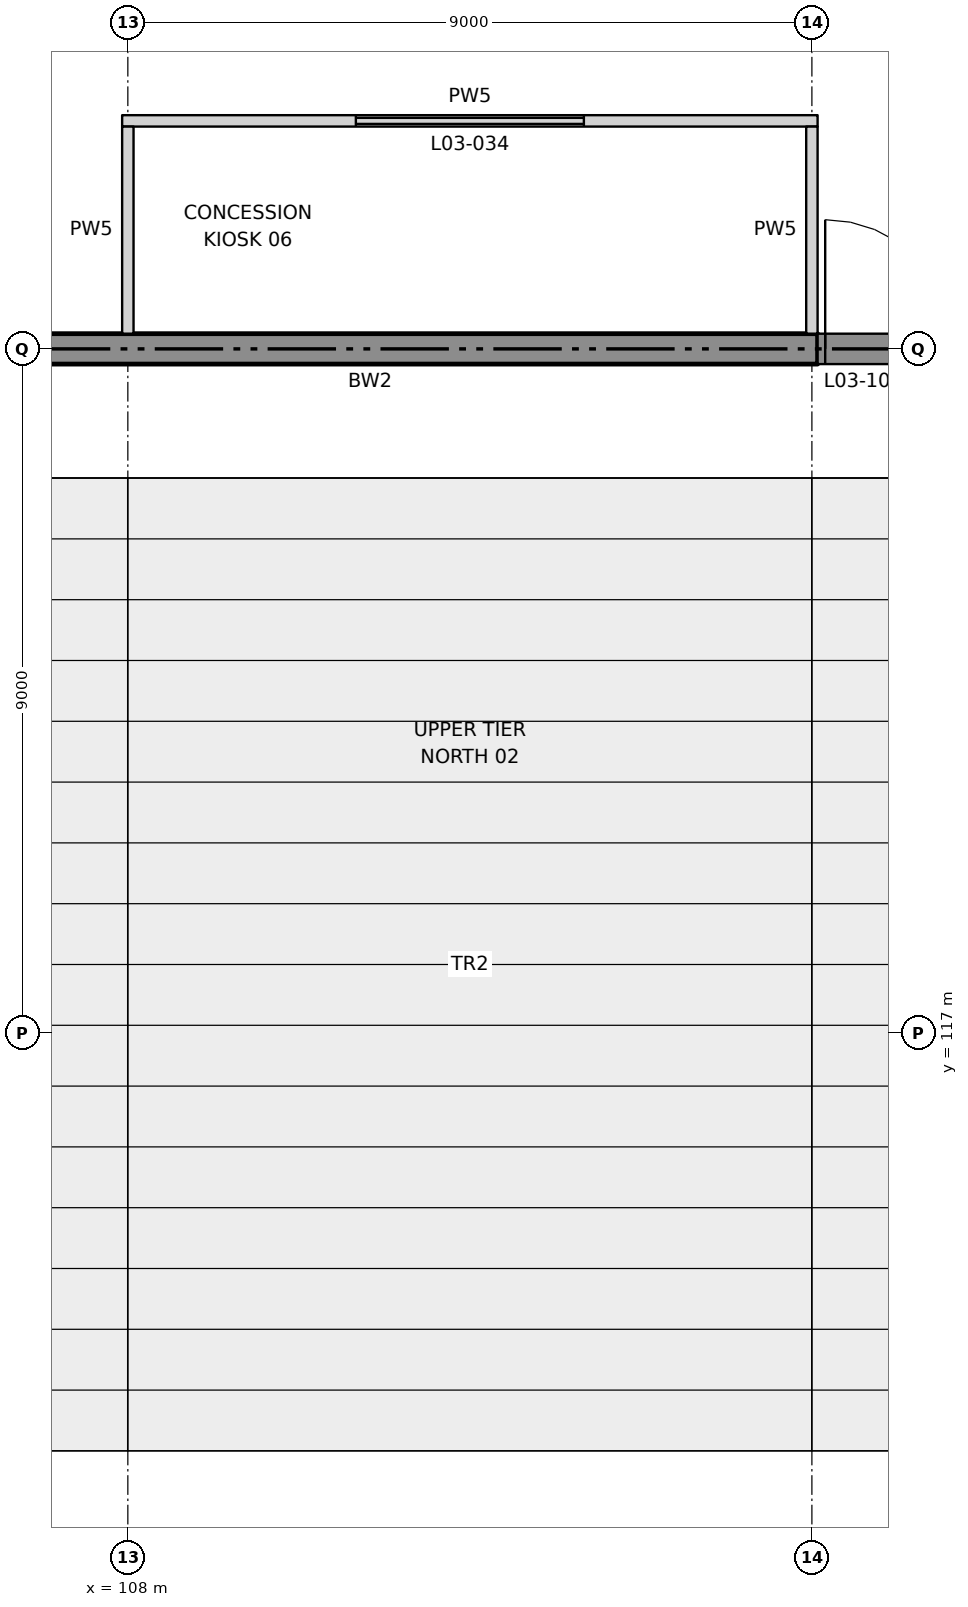
"""IFC4 building model, lengths in metres.
Left out: names, types, materials, properties, quantities, classifications, styles, units other than length and angle.
Written with IfcOpenShell. Run it as: python <this file> out.ifc"""

import sys

from ifc_helpers import new_model, si_unit, direction, frame, frame_2d, origin, place, context, subcontext, project, spatial, rectangle, extrude, element, fill, save


model = new_model("IFC4")
c1 = context("Model", 3, precision=1e-05, world=origin(), true_north=direction((0.0, 1.0)))
c2 = subcontext(c1, "Body", "Model", "MODEL_VIEW")
j1 = project(units=[si_unit("LENGTHUNIT", "METRE"), si_unit("PLANEANGLEUNIT", "RADIAN")], contexts=[c1])
p1 = place(None, origin())
s1 = spatial("IfcSite", under=j1, at=p1, CompositionType="ELEMENT")
p2 = place(p1, origin())
s2 = spatial("IfcBuilding", under=s1, at=p2, CompositionType="ELEMENT")
p3 = place(p2, frame((0.0, 0.0, 22.0)))
s3 = spatial("IfcBuildingStorey", under=s2, at=p3, CompositionType="ELEMENT", Elevation=22.0)
p4 = place(p3, frame((117.075, 126.0, 0.0), z_axis=(0.0, 0.0, 1.0), x_axis=(-1.0, 0.0, 0.0)))
e1 = element("IfcWall", 1, at=p4, inside=s3, PredefinedType="SOLIDWALL", context=c2, shape_type="SweptSolid", body=[
    extrude(rectangle(XDim=11.775, YDim=0.4, at=frame_2d((5.887, 0.0))), origin(), (0.0, 0.0, 1.0), 6.0),
])
p5 = place(p3, frame((107.925, 129.0, 0.0), z_axis=(0.0, 0.0, 1.0), x_axis=(1.0, 0.0, 0.0)))
e2 = element("IfcWall", 2, at=p5, inside=s3, PredefinedType="PARTITIONING", context=c2, shape_type="SweptSolid", body=[
    extrude(rectangle(XDim=9.15, YDim=0.15, at=frame_2d((4.575, 0.0))), origin(), (0.0, 0.0, 1.0), 6.0),
])
p6 = place(p5, frame((3.075, 0.0, 0.0)))
e3 = element("IfcOpeningElement", 3, at=p6, cuts=e2, PredefinedType="OPENING", context=c2, shape_type="SweptSolid", body=[
    extrude(rectangle(XDim=3.0, YDim=2.4, at=frame_2d((1.5, 1.2))), frame((0.0, 0.085, 0.0), z_axis=(0.0, -1.0, 0.0), x_axis=(1.0, 0.0, 0.0)), (0.0, 0.0, 1.0), 0.17),
])
for number, where, z_axis, x_axis in (
    (4, (108.0, 126.2, 0.0), (0.0, 0.0, 1.0), (0.0, 1.0, 0.0)),
    (5, (117.0, 126.2, 0.0), (0.0, 0.0, 1.0), (0.0, 1.0, 0.0)),
):
    element("IfcWall", number, at=place(p3, frame(where, z_axis=z_axis, x_axis=x_axis)), inside=s3, PredefinedType="PARTITIONING", context=c2, shape_type="SweptSolid", body=[
        extrude(rectangle(XDim=2.725, YDim=0.15, at=frame_2d((1.363, 0.0))), origin(), (0.0, 0.0, 1.0), 4.7),
    ])
p7 = place(p3, frame((117.075, 126.0, 0.0), z_axis=(0.0, 0.0, 1.0), x_axis=(1.0, 0.0, 0.0)))
e6 = element("IfcWall", 6, at=p7, inside=s3, PredefinedType="SOLIDWALL", context=c2, shape_type="SweptSolid", body=[
    extrude(rectangle(XDim=3.6, YDim=0.4, at=frame_2d((1.8, 0.0))), origin(), (0.0, 0.0, 1.0), 3.0),
])
p8 = place(p7, frame((0.1, 0.0, 0.0)))
e7 = element("IfcOpeningElement", 7, at=p8, cuts=e6, PredefinedType="OPENING", context=c2, shape_type="SweptSolid", body=[
    extrude(rectangle(XDim=3.4, YDim=2.4, at=frame_2d((1.7, 1.2))), frame((0.0, 0.21, 0.0), z_axis=(0.0, -1.0, 0.0), x_axis=(1.0, 0.0, 0.0)), (0.0, 0.0, 1.0), 0.42),
])
p9 = place(p6, origin())
e8 = element("IfcDoor", 8, at=p9, inside=s3, OperationType="ROLLINGUP", PredefinedType="DOOR", context=c2, shape_type="SweptSolid", body=[
    extrude(rectangle(XDim=3.0, YDim=2.4, at=frame_2d((1.5, 1.2))), frame((0.0, 0.025, 0.0), z_axis=(0.0, -1.0, 0.0), x_axis=(1.0, 0.0, 0.0)), (0.0, 0.0, 1.0), 0.05),
])
fill(e3, e8)
p10 = place(p8, origin())
e9 = element("IfcDoor", 9, at=p10, inside=s3, OperationType="DOUBLE_DOOR_SINGLE_SWING", PredefinedType="DOOR", context=c2, shape_type="SweptSolid", body=[
    extrude(rectangle(XDim=3.4, YDim=2.4, at=frame_2d((1.7, 1.2))), frame((0.0, 0.025, 0.0), z_axis=(0.0, -1.0, 0.0), x_axis=(1.0, 0.0, 0.0)), (0.0, 0.0, 1.0), 0.05),
])
fill(e7, e9)
save(model, sys.argv[1])
